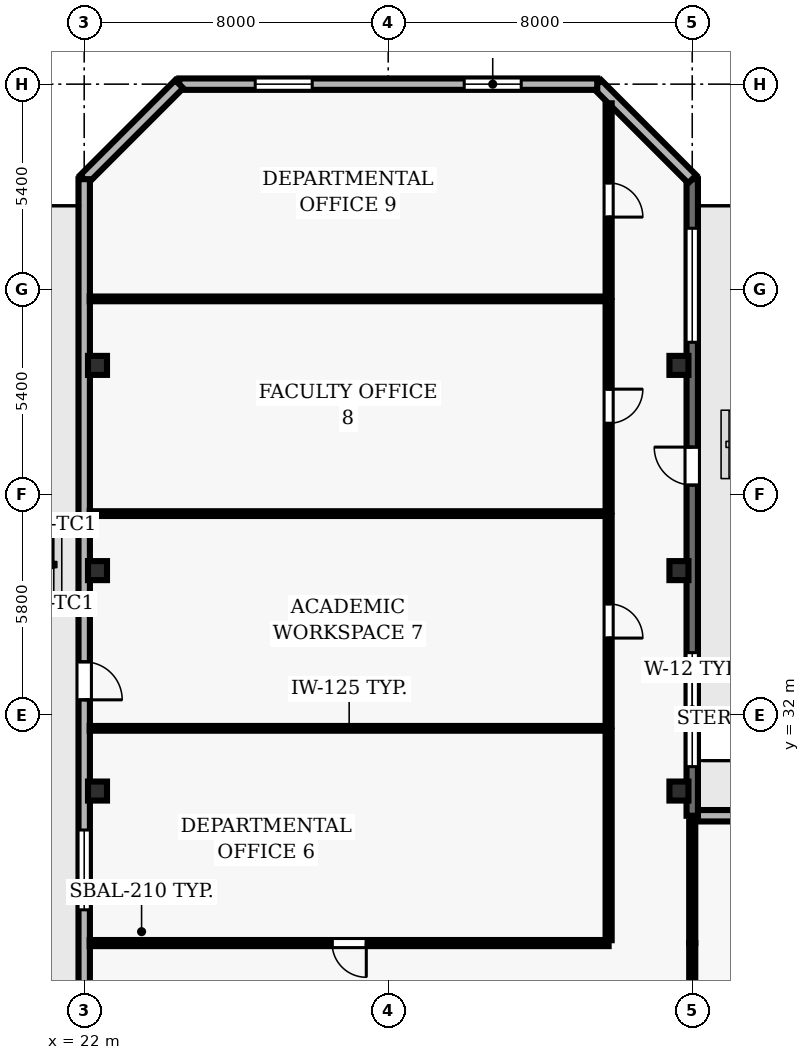
"""IFC4 building model, lengths in metres.
Left out: names, types, materials, properties, quantities, classifications, styles, units other than length and angle.
Written with IfcOpenShell. Run it as: python <this file> out.ifc"""

import sys

from ifc_helpers import new_model, si_unit, direction, frame, frame_2d, origin, origin_2d, place, context, subcontext, project, spatial, rectangle, hollow_rectangle, extrude, element, fill, save


model = new_model("IFC4")
c1 = context("Model", 3, precision=1e-05, world=origin(), true_north=direction((0.0, 1.0)))
c2 = subcontext(c1, "Body", "Model", "MODEL_VIEW")
j1 = project(units=[si_unit("LENGTHUNIT", "METRE"), si_unit("PLANEANGLEUNIT", "RADIAN")], contexts=[c1])
p1 = place(None, origin())
s1 = spatial("IfcSite", under=j1, at=p1, CompositionType="ELEMENT")
p2 = place(p1, origin())
s2 = spatial("IfcBuilding", under=s1, at=p2, CompositionType="ELEMENT")
p3 = place(p2, frame((0.0, 0.0, 115.1)))
s3 = spatial("IfcBuildingStorey", under=s2, at=p3, CompositionType="ELEMENT", Elevation=115.1)
for number, where, z_axis, x_axis in (
    (1, (22.35, 30.0, 0.0), (0.0, 0.0, 1.0), (1.0, 0.0, 0.0)),
    (2, (37.65, 30.0, 0.0), (0.0, 0.0, 1.0), (1.0, 0.0, 0.0)),
    (3, (22.35, 35.8, 0.0), (0.0, 0.0, 1.0), (1.0, 0.0, 0.0)),
    (4, (37.65, 35.8, 0.0), (0.0, 0.0, 1.0), (1.0, 0.0, 0.0)),
    (5, (22.35, 41.2, 0.0), (0.0, 0.0, 1.0), (1.0, 0.0, 0.0)),
    (6, (37.65, 41.2, 0.0), (0.0, 0.0, 1.0), (1.0, 0.0, 0.0)),
):
    element("IfcColumn", number, at=place(p3, frame(where, z_axis=z_axis, x_axis=x_axis)), inside=s3, PredefinedType="COLUMN", context=c2, shape_type="SweptSolid", body=[
        extrude(hollow_rectangle(XDim=0.5, YDim=0.5, WallThickness=0.025, at=origin_2d()), origin(), (0.0, 0.0, 1.0), 3.9),
    ])
p4 = place(p3, frame((46.804, 29.35, 0.0), z_axis=(0.0, 0.0, 1.0), x_axis=(-1.0, 0.0, 0.0)))
e7 = element("IfcWall", 7, at=p4, inside=s3, PredefinedType="SOLIDWALL", context=c2, shape_type="SweptSolid", body=[
    extrude(rectangle(XDim=8.804, YDim=0.3, at=frame_2d((4.402, 0.0))), origin(), (0.0, 0.0, 1.0), 3.69),
])
p5 = place(p4, frame((3.727, 0.0, 0.0)))
e8 = element("IfcOpeningElement", 8, at=p5, cuts=e7, PredefinedType="OPENING", context=c2, shape_type="SweptSolid", body=[
    extrude(rectangle(XDim=1.35, YDim=2.2, at=frame_2d((0.675, 1.1))), frame((0.0, 0.16, 0.0), z_axis=(0.0, -1.0, 0.0), x_axis=(1.0, 0.0, 0.0)), (0.0, 0.0, 1.0), 0.32),
])
p6 = place(p3, frame((38.0, 29.35, 0.0), z_axis=(0.0, 0.0, 1.0), x_axis=(0.0, 1.0, 0.0)))
e9 = element("IfcWall", 9, at=p6, inside=s3, PredefinedType="SOLIDWALL", context=c2, shape_type="SweptSolid", body=[
    extrude(rectangle(XDim=16.75, YDim=0.3, at=frame_2d((8.375, 0.0))), origin(), (0.0, 0.0, 1.0), 3.69),
])
p7 = place(p6, frame((8.7, 0.0, 0.0)))
e10 = element("IfcOpeningElement", 10, at=p7, cuts=e9, PredefinedType="OPENING", context=c2, shape_type="SweptSolid", body=[
    extrude(rectangle(XDim=1.0, YDim=2.2, at=frame_2d((0.5, 1.1))), frame((0.0, 0.16, 0.0), z_axis=(0.0, -1.0, 0.0), x_axis=(1.0, 0.0, 0.0)), (0.0, 0.0, 1.0), 0.32),
])
p8 = place(p6, frame((1.292, 0.0, 0.9)))
e11 = element("IfcOpeningElement", 11, at=p8, cuts=e9, PredefinedType="OPENING", context=c2, shape_type="SweptSolid", body=[
    extrude(rectangle(XDim=3.0, YDim=2.2, at=frame_2d((1.5, 1.1))), frame((0.0, 0.16, 0.0), z_axis=(0.0, -1.0, 0.0), x_axis=(1.0, 0.0, 0.0)), (0.0, 0.0, 1.0), 0.32),
])
p9 = place(p6, frame((12.458, 0.0, 0.9)))
e12 = element("IfcOpeningElement", 12, at=p9, cuts=e9, PredefinedType="OPENING", context=c2, shape_type="SweptSolid", body=[
    extrude(rectangle(XDim=3.0, YDim=2.2, at=frame_2d((1.5, 1.1))), frame((0.0, 0.16, 0.0), z_axis=(0.0, -1.0, 0.0), x_axis=(1.0, 0.0, 0.0)), (0.0, 0.0, 1.0), 0.32),
])
p10 = place(p3, frame((38.0, 46.1, 0.0), z_axis=(0.0, 0.0, 1.0), x_axis=(-0.707106781187, 0.707106781187, 0.0)))
e13 = element("IfcWall", 13, at=p10, inside=s3, PredefinedType="SOLIDWALL", context=c2, shape_type="SweptSolid", body=[
    extrude(rectangle(XDim=3.536, YDim=0.3, at=frame_2d((1.768, 0.0))), origin(), (0.0, 0.0, 1.0), 3.69),
])
p11 = place(p3, frame((35.5, 48.6, 0.0), z_axis=(0.0, 0.0, 1.0), x_axis=(-1.0, 0.0, 0.0)))
e14 = element("IfcWall", 14, at=p11, inside=s3, PredefinedType="SOLIDWALL", context=c2, shape_type="SweptSolid", body=[
    extrude(rectangle(XDim=11.0, YDim=0.3, at=frame_2d((5.5, 0.0))), origin(), (0.0, 0.0, 1.0), 3.69),
])
p12 = place(p11, frame((2.0, 0.0, 0.9)))
e15 = element("IfcOpeningElement", 15, at=p12, cuts=e14, PredefinedType="OPENING", context=c2, shape_type="SweptSolid", body=[
    extrude(rectangle(XDim=1.5, YDim=1.6, at=frame_2d((0.75, 0.8))), frame((0.0, 0.16, 0.0), z_axis=(0.0, -1.0, 0.0), x_axis=(1.0, 0.0, 0.0)), (0.0, 0.0, 1.0), 0.32),
])
p13 = place(p11, frame((7.5, 0.0, 0.9)))
e16 = element("IfcOpeningElement", 16, at=p13, cuts=e14, PredefinedType="OPENING", context=c2, shape_type="SweptSolid", body=[
    extrude(rectangle(XDim=1.5, YDim=1.6, at=frame_2d((0.75, 0.8))), frame((0.0, 0.16, 0.0), z_axis=(0.0, -1.0, 0.0), x_axis=(1.0, 0.0, 0.0)), (0.0, 0.0, 1.0), 0.32),
])
p14 = place(p3, frame((24.5, 48.6, 0.0), z_axis=(0.0, 0.0, 1.0), x_axis=(-0.707106781187, -0.707106781187, 0.0)))
e17 = element("IfcWall", 17, at=p14, inside=s3, PredefinedType="SOLIDWALL", context=c2, shape_type="SweptSolid", body=[
    extrude(rectangle(XDim=3.536, YDim=0.3, at=frame_2d((1.768, 0.0))), origin(), (0.0, 0.0, 1.0), 3.69),
])
p15 = place(p3, frame((22.0, 46.1, 0.0), z_axis=(0.0, 0.0, 1.0), x_axis=(0.0, -1.0, 0.0)))
e18 = element("IfcWall", 18, at=p15, inside=s3, PredefinedType="SOLIDWALL", context=c2, shape_type="SweptSolid", body=[
    extrude(rectangle(XDim=43.6, YDim=0.3, at=frame_2d((21.8, 0.0))), origin(), (0.0, 0.0, 1.0), 3.69),
])
p16 = place(p15, frame((12.7, 0.0, 0.0)))
e19 = element("IfcOpeningElement", 19, at=p16, cuts=e18, PredefinedType="OPENING", context=c2, shape_type="SweptSolid", body=[
    extrude(rectangle(XDim=1.0, YDim=2.2, at=frame_2d((0.5, 1.1))), frame((0.0, 0.16, 0.0), z_axis=(0.0, -1.0, 0.0), x_axis=(1.0, 0.0, 0.0)), (0.0, 0.0, 1.0), 0.32),
])
p17 = place(p15, frame((17.125, 0.0, 0.9)))
e20 = element("IfcOpeningElement", 20, at=p17, cuts=e18, PredefinedType="OPENING", context=c2, shape_type="SweptSolid", body=[
    extrude(rectangle(XDim=2.1, YDim=1.6, at=frame_2d((1.05, 0.8))), frame((0.0, 0.16, 0.0), z_axis=(0.0, -1.0, 0.0), x_axis=(1.0, 0.0, 0.0)), (0.0, 0.0, 1.0), 0.32),
])
p18 = place(p15, frame((23.475, 0.0, 0.9)))
e21 = element("IfcOpeningElement", 21, at=p18, cuts=e18, PredefinedType="OPENING", context=c2, shape_type="SweptSolid", body=[
    extrude(rectangle(XDim=2.1, YDim=1.6, at=frame_2d((1.05, 0.8))), frame((0.0, 0.16, 0.0), z_axis=(0.0, -1.0, 0.0), x_axis=(1.0, 0.0, 0.0)), (0.0, 0.0, 1.0), 0.32),
])
p19 = place(p15, frame((28.475, 0.0, 0.9)))
e22 = element("IfcOpeningElement", 22, at=p19, cuts=e18, PredefinedType="OPENING", context=c2, shape_type="SweptSolid", body=[
    extrude(rectangle(XDim=2.1, YDim=1.6, at=frame_2d((1.05, 0.8))), frame((0.0, 0.16, 0.0), z_axis=(0.0, -1.0, 0.0), x_axis=(1.0, 0.0, 0.0)), (0.0, 0.0, 1.0), 0.32),
])
p20 = place(p15, frame((34.375, 0.0, 0.9)))
e23 = element("IfcOpeningElement", 23, at=p20, cuts=e18, PredefinedType="OPENING", context=c2, shape_type="SweptSolid", body=[
    extrude(rectangle(XDim=2.1, YDim=1.6, at=frame_2d((1.05, 0.8))), frame((0.0, 0.16, 0.0), z_axis=(0.0, -1.0, 0.0), x_axis=(1.0, 0.0, 0.0)), (0.0, 0.0, 1.0), 0.32),
])
p21 = place(p3, frame((35.8, 26.0, 0.0), z_axis=(0.0, 0.0, 1.0), x_axis=(-1.0, 0.0, 0.0)))
e24 = element("IfcWall", 24, at=p21, inside=s3, PredefinedType="PARTITIONING", context=c2, shape_type="SweptSolid", body=[
    extrude(rectangle(XDim=13.655, YDim=0.16, at=frame_2d((6.828, 0.0))), origin(), (0.0, 0.0, 1.0), 3.69),
])
p22 = place(p21, frame((6.377, 0.0, 0.0)))
e25 = element("IfcOpeningElement", 25, at=p22, cuts=e24, PredefinedType="OPENING", context=c2, shape_type="SweptSolid", body=[
    extrude(rectangle(XDim=0.9, YDim=2.1, at=frame_2d((0.45, 1.05))), frame((0.0, 0.09, 0.0), z_axis=(0.0, -1.0, 0.0), x_axis=(1.0, 0.0, 0.0)), (0.0, 0.0, 1.0), 0.18),
])
for number, where, z_axis, x_axis in (
    (26, (35.8, 31.65, 0.0), (0.0, 0.0, 1.0), (-1.0, 0.0, 0.0)),
    (27, (35.8, 37.3, 0.0), (0.0, 0.0, 1.0), (-1.0, 0.0, 0.0)),
    (28, (35.8, 42.95, 0.0), (0.0, 0.0, 1.0), (-1.0, 0.0, 0.0)),
):
    element("IfcWall", number, at=place(p3, frame(where, z_axis=z_axis, x_axis=x_axis)), inside=s3, PredefinedType="PARTITIONING", context=c2, shape_type="SweptSolid", body=[
        extrude(rectangle(XDim=13.655, YDim=0.125, at=frame_2d((6.828, 0.0))), origin(), (0.0, 0.0, 1.0), 3.69),
    ])
p23 = place(p3, frame((35.8, 31.592, 0.0), z_axis=(0.0, 0.0, 1.0), x_axis=(0.0, -1.0, 0.0)))
e29 = element("IfcWall", 29, at=p23, inside=s3, PredefinedType="PARTITIONING", context=c2, shape_type="SweptSolid", body=[
    extrude(rectangle(XDim=5.517, YDim=0.16, at=frame_2d((2.759, 0.0))), origin(), (0.0, 0.0, 1.0), 3.69),
])
p24 = place(p3, frame((35.8, 37.242, 0.0), z_axis=(0.0, 0.0, 1.0), x_axis=(0.0, -1.0, 0.0)))
e30 = element("IfcWall", 30, at=p24, inside=s3, PredefinedType="PARTITIONING", context=c2, shape_type="SweptSolid", body=[
    extrude(rectangle(XDim=5.535, YDim=0.16, at=frame_2d((2.768, 0.0))), origin(), (0.0, 0.0, 1.0), 3.69),
])
p25 = place(p24, frame((2.317, 0.0, 0.0)))
e31 = element("IfcOpeningElement", 31, at=p25, cuts=e30, PredefinedType="OPENING", context=c2, shape_type="SweptSolid", body=[
    extrude(rectangle(XDim=0.9, YDim=2.1, at=frame_2d((0.45, 1.05))), frame((0.0, 0.09, 0.0), z_axis=(0.0, -1.0, 0.0), x_axis=(1.0, 0.0, 0.0)), (0.0, 0.0, 1.0), 0.18),
])
p26 = place(p3, frame((35.8, 42.893, 0.0), z_axis=(0.0, 0.0, 1.0), x_axis=(0.0, -1.0, 0.0)))
e32 = element("IfcWall", 32, at=p26, inside=s3, PredefinedType="PARTITIONING", context=c2, shape_type="SweptSolid", body=[
    extrude(rectangle(XDim=5.536, YDim=0.16, at=frame_2d((2.768, 0.0))), origin(), (0.0, 0.0, 1.0), 3.69),
])
p27 = place(p26, frame((2.318, 0.0, 0.0)))
e33 = element("IfcOpeningElement", 33, at=p27, cuts=e32, PredefinedType="OPENING", context=c2, shape_type="SweptSolid", body=[
    extrude(rectangle(XDim=0.9, YDim=2.1, at=frame_2d((0.45, 1.05))), frame((0.0, 0.09, 0.0), z_axis=(0.0, -1.0, 0.0), x_axis=(1.0, 0.0, 0.0)), (0.0, 0.0, 1.0), 0.18),
])
p28 = place(p3, frame((35.8, 48.095, 0.0), z_axis=(0.0, 0.0, 1.0), x_axis=(0.0, -1.0, 0.0)))
e34 = element("IfcWall", 34, at=p28, inside=s3, PredefinedType="PARTITIONING", context=c2, shape_type="SweptSolid", body=[
    extrude(rectangle(XDim=5.087, YDim=0.16, at=frame_2d((2.543, 0.0))), origin(), (0.0, 0.0, 1.0), 3.69),
])
p29 = place(p28, frame((2.093, 0.0, 0.0)))
e35 = element("IfcOpeningElement", 35, at=p29, cuts=e34, PredefinedType="OPENING", context=c2, shape_type="SweptSolid", body=[
    extrude(rectangle(XDim=0.9, YDim=2.1, at=frame_2d((0.45, 1.05))), frame((0.0, 0.09, 0.0), z_axis=(0.0, -1.0, 0.0), x_axis=(1.0, 0.0, 0.0)), (0.0, 0.0, 1.0), 0.18),
])
p30 = place(p3, frame((38.0, 23.85, 0.0), z_axis=(0.0, 0.0, 1.0), x_axis=(0.0, 1.0, 0.0)))
e36 = element("IfcWall", 36, at=p30, inside=s3, PredefinedType="PARTITIONING", context=c2, shape_type="SweptSolid", body=[
    extrude(rectangle(XDim=2.15, YDim=0.16, at=frame_2d((1.075, 0.0))), origin(), (0.0, 0.0, 1.0), 3.073),
])
p31 = place(p3, frame((38.0, 26.0, 0.0), z_axis=(0.0, 0.0, 1.0), x_axis=(0.0, 1.0, 0.0)))
e37 = element("IfcWall", 37, at=p31, inside=s3, PredefinedType="PARTITIONING", context=c2, shape_type="SweptSolid", body=[
    extrude(rectangle(XDim=3.205, YDim=0.16, at=frame_2d((1.603, 0.0))), origin(), (0.0, 0.0, 1.0), 3.073),
])
p32 = place(p7, origin())
e38 = element("IfcDoor", 38, at=p32, inside=s3, OperationType="SINGLE_SWING_RIGHT", PredefinedType="DOOR", context=c2, shape_type="SweptSolid", body=[
    extrude(rectangle(XDim=1.0, YDim=2.2, at=frame_2d((0.5, 1.1))), frame((0.0, 0.025, 0.0), z_axis=(0.0, -1.0, 0.0), x_axis=(1.0, 0.0, 0.0)), (0.0, 0.0, 1.0), 0.05),
])
fill(e10, e38)
p33 = place(p8, origin())
e39 = element("IfcWindow", 39, at=p33, inside=s3, PartitioningType="SINGLE_PANEL", PredefinedType="WINDOW", context=c2, shape_type="SweptSolid", body=[
    extrude(rectangle(XDim=3.0, YDim=2.2, at=frame_2d((1.5, 1.1))), frame((0.0, 0.03, 0.0), z_axis=(0.0, -1.0, 0.0), x_axis=(1.0, 0.0, 0.0)), (0.0, 0.0, 1.0), 0.06),
])
fill(e11, e39)
p34 = place(p9, origin())
e40 = element("IfcWindow", 40, at=p34, inside=s3, PartitioningType="SINGLE_PANEL", PredefinedType="WINDOW", context=c2, shape_type="SweptSolid", body=[
    extrude(rectangle(XDim=3.0, YDim=2.2, at=frame_2d((1.5, 1.1))), frame((0.0, 0.03, 0.0), z_axis=(0.0, -1.0, 0.0), x_axis=(1.0, 0.0, 0.0)), (0.0, 0.0, 1.0), 0.06),
])
fill(e12, e40)
p35 = place(p12, origin())
e41 = element("IfcWindow", 41, at=p35, inside=s3, PartitioningType="SINGLE_PANEL", PredefinedType="WINDOW", context=c2, shape_type="SweptSolid", body=[
    extrude(rectangle(XDim=1.5, YDim=1.6, at=frame_2d((0.75, 0.8))), frame((0.0, 0.03, 0.0), z_axis=(0.0, -1.0, 0.0), x_axis=(1.0, 0.0, 0.0)), (0.0, 0.0, 1.0), 0.06),
])
fill(e15, e41)
p36 = place(p13, origin())
e42 = element("IfcWindow", 42, at=p36, inside=s3, PartitioningType="SINGLE_PANEL", PredefinedType="WINDOW", context=c2, shape_type="SweptSolid", body=[
    extrude(rectangle(XDim=1.5, YDim=1.6, at=frame_2d((0.75, 0.8))), frame((0.0, 0.03, 0.0), z_axis=(0.0, -1.0, 0.0), x_axis=(1.0, 0.0, 0.0)), (0.0, 0.0, 1.0), 0.06),
])
fill(e16, e42)
p37 = place(p16, origin())
e43 = element("IfcDoor", 43, at=p37, inside=s3, OperationType="SINGLE_SWING_RIGHT", PredefinedType="DOOR", context=c2, shape_type="SweptSolid", body=[
    extrude(rectangle(XDim=1.0, YDim=2.2, at=frame_2d((0.5, 1.1))), frame((0.0, 0.025, 0.0), z_axis=(0.0, -1.0, 0.0), x_axis=(1.0, 0.0, 0.0)), (0.0, 0.0, 1.0), 0.05),
])
fill(e19, e43)
p38 = place(p17, origin())
e44 = element("IfcWindow", 44, at=p38, inside=s3, PartitioningType="SINGLE_PANEL", PredefinedType="WINDOW", context=c2, shape_type="SweptSolid", body=[
    extrude(rectangle(XDim=2.1, YDim=1.6, at=frame_2d((1.05, 0.8))), frame((0.0, 0.03, 0.0), z_axis=(0.0, -1.0, 0.0), x_axis=(1.0, 0.0, 0.0)), (0.0, 0.0, 1.0), 0.06),
])
fill(e20, e44)
p39 = place(p22, origin())
e45 = element("IfcDoor", 45, at=p39, inside=s3, OperationType="SINGLE_SWING_LEFT", PredefinedType="DOOR", context=c2, shape_type="SweptSolid", body=[
    extrude(rectangle(XDim=0.9, YDim=2.1, at=frame_2d((0.45, 1.05))), frame((0.0, 0.025, 0.0), z_axis=(0.0, -1.0, 0.0), x_axis=(1.0, 0.0, 0.0)), (0.0, 0.0, 1.0), 0.05),
])
fill(e25, e45)
p40 = place(p25, origin())
e46 = element("IfcDoor", 46, at=p40, inside=s3, OperationType="SINGLE_SWING_RIGHT", PredefinedType="DOOR", context=c2, shape_type="SweptSolid", body=[
    extrude(rectangle(XDim=0.9, YDim=2.1, at=frame_2d((0.45, 1.05))), frame((0.0, 0.025, 0.0), z_axis=(0.0, -1.0, 0.0), x_axis=(1.0, 0.0, 0.0)), (0.0, 0.0, 1.0), 0.05),
])
fill(e31, e46)
p41 = place(p27, origin())
e47 = element("IfcDoor", 47, at=p41, inside=s3, OperationType="SINGLE_SWING_LEFT", PredefinedType="DOOR", context=c2, shape_type="SweptSolid", body=[
    extrude(rectangle(XDim=0.9, YDim=2.1, at=frame_2d((0.45, 1.05))), frame((0.0, 0.025, 0.0), z_axis=(0.0, -1.0, 0.0), x_axis=(1.0, 0.0, 0.0)), (0.0, 0.0, 1.0), 0.05),
])
fill(e33, e47)
p42 = place(p29, origin())
e48 = element("IfcDoor", 48, at=p42, inside=s3, OperationType="SINGLE_SWING_RIGHT", PredefinedType="DOOR", context=c2, shape_type="SweptSolid", body=[
    extrude(rectangle(XDim=0.9, YDim=2.1, at=frame_2d((0.45, 1.05))), frame((0.0, 0.025, 0.0), z_axis=(0.0, -1.0, 0.0), x_axis=(1.0, 0.0, 0.0)), (0.0, 0.0, 1.0), 0.05),
])
fill(e35, e48)
save(model, sys.argv[1])
